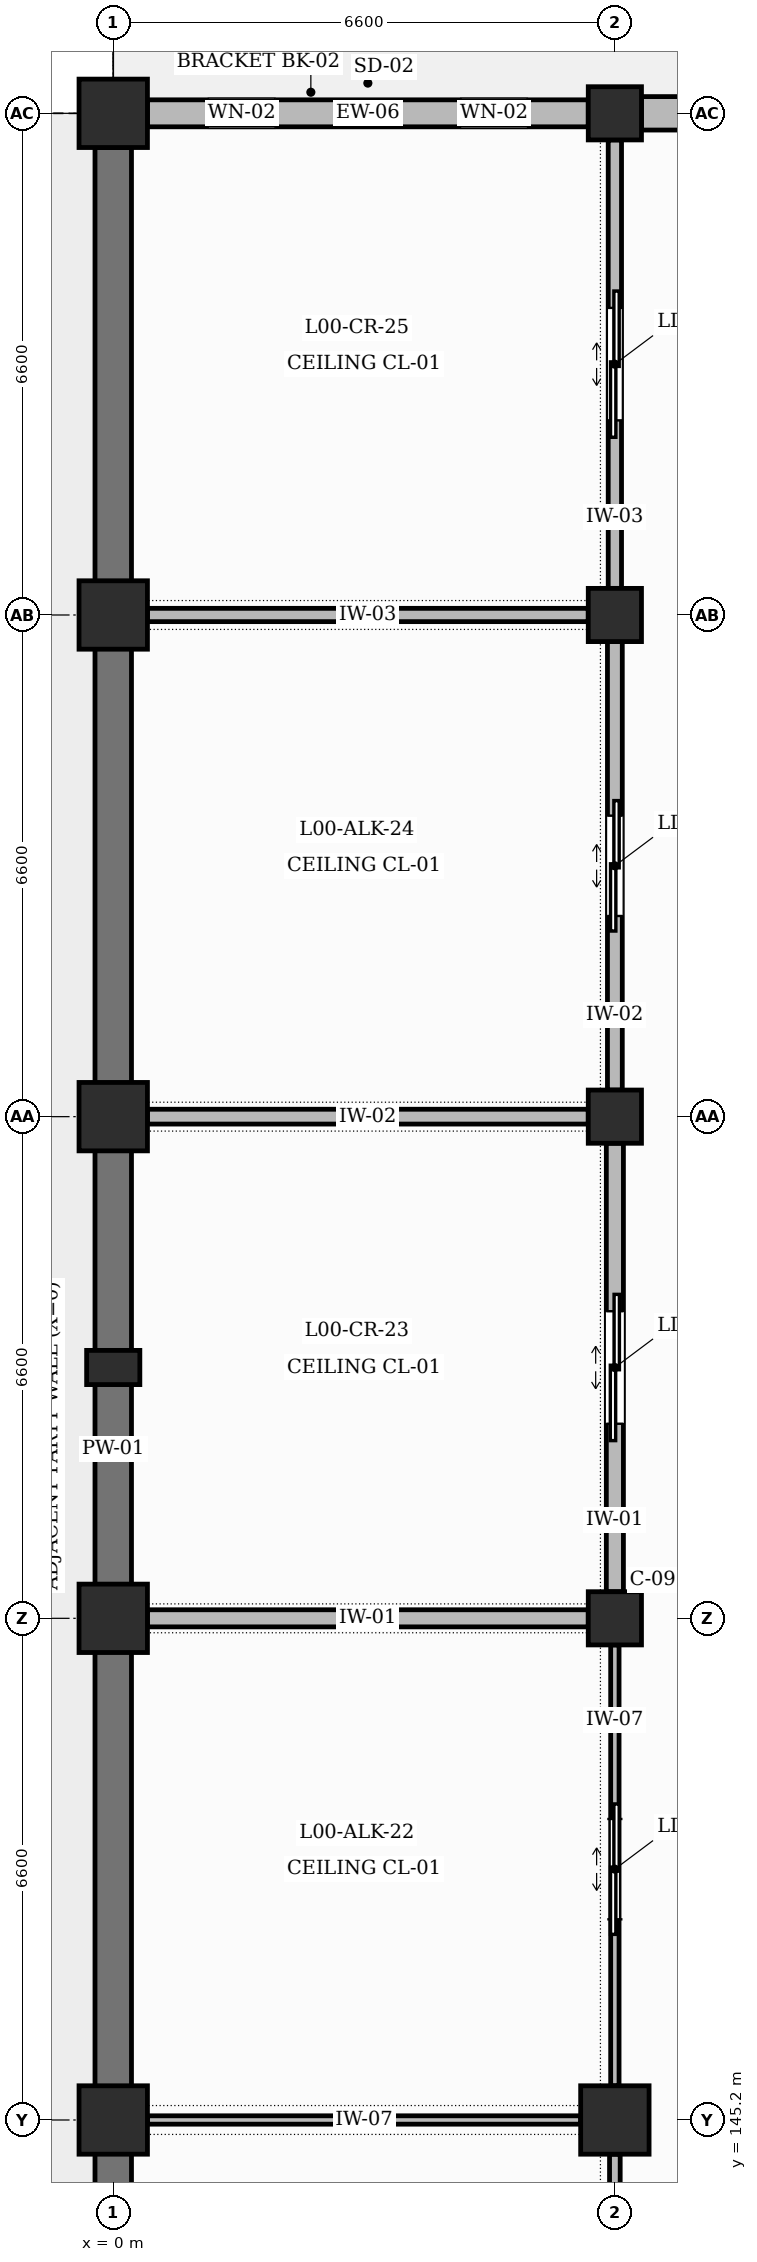
"""IFC4 building model, lengths in metres.
Left out: names, types, materials, properties, quantities, classifications, styles, units other than length and angle.
Written with IfcOpenShell. Run it as: python <this file> out.ifc"""

import sys

from ifc_helpers import new_model, si_unit, direction, frame, frame_2d, origin, origin_2d, place, context, subcontext, project, spatial, rectangle, circle, extrude, element, fill, save


model = new_model("IFC4")
c1 = context("Model", 3, precision=1e-05, world=origin(), true_north=direction((0.0, 1.0)))
c2 = subcontext(c1, "Body", "Model", "MODEL_VIEW")
j1 = project(units=[si_unit("LENGTHUNIT", "METRE"), si_unit("PLANEANGLEUNIT", "RADIAN")], contexts=[c1])
p1 = place(None, origin())
s1 = spatial("IfcSite", under=j1, at=p1, CompositionType="ELEMENT")
p2 = place(p1, origin())
s2 = spatial("IfcBuilding", under=s1, at=p2, CompositionType="ELEMENT")
p3 = place(p2, origin())
s3 = spatial("IfcBuildingStorey", under=s2, at=p3, CompositionType="ELEMENT", Elevation=0.0)
p4 = place(p3, frame((0.0, 155.1, 0.0), z_axis=(0.0, 0.0, 1.0), x_axis=(0.0, 1.0, 0.0)))
e1 = element("IfcColumn", 1, at=p4, inside=s3, PredefinedType="PILASTER", context=c2, shape_type="SweptSolid", body=[
    extrude(rectangle(XDim=0.45, YDim=0.7, at=origin_2d()), origin(), (0.0, 0.0, 1.0), 5.4),
])
for number, where, z_axis, x_axis in (
    (2, (0.0, 145.2, 0.0), (0.0, 0.0, 1.0), (1.0, 0.0, 0.0)),
    (3, (0.0, 151.8, 0.0), (0.0, 0.0, 1.0), (1.0, 0.0, 0.0)),
    (4, (0.0, 158.4, 0.0), (0.0, 0.0, 1.0), (1.0, 0.0, 0.0)),
    (5, (0.0, 165.0, 0.0), (0.0, 0.0, 1.0), (1.0, 0.0, 0.0)),
    (6, (0.0, 171.6, 0.0), (0.0, 0.0, 1.0), (1.0, 0.0, 0.0)),
    (7, (6.6, 145.2, 0.0), (0.0, 0.0, 1.0), (1.0, 0.0, 0.0)),
):
    element("IfcColumn", number, at=place(p3, frame(where, z_axis=z_axis, x_axis=x_axis)), inside=s3, PredefinedType="COLUMN", context=c2, shape_type="SweptSolid", body=[
        extrude(rectangle(XDim=0.9, YDim=0.9, at=origin_2d()), origin(), (0.0, 0.0, 1.0), 5.4),
    ])
for number, where, z_axis, x_axis in (
    (8, (6.6, 151.8, 0.0), (0.0, 0.0, 1.0), (1.0, 0.0, 0.0)),
    (9, (6.6, 158.4, 0.0), (0.0, 0.0, 1.0), (1.0, 0.0, 0.0)),
    (10, (6.6, 165.0, 0.0), (0.0, 0.0, 1.0), (1.0, 0.0, 0.0)),
    (11, (6.6, 171.6, 0.0), (0.0, 0.0, 1.0), (1.0, 0.0, 0.0)),
):
    element("IfcColumn", number, at=place(p3, frame(where, z_axis=z_axis, x_axis=x_axis)), inside=s3, PredefinedType="COLUMN", context=c2, shape_type="SweptSolid", body=[
        extrude(circle(Radius=0.35, at=origin_2d()), origin(), (0.0, 0.0, 1.0), 5.4),
    ])
p5 = place(p3, frame((0.0, 139.05, 0.0), z_axis=(0.0, 0.0, 1.0), x_axis=(0.0, 1.0, 0.0)))
e12 = element("IfcWall", 12, at=p5, inside=s3, PredefinedType="SOLIDWALL", context=c2, shape_type="SweptSolid", body=[
    extrude(rectangle(XDim=5.7, YDim=0.48, at=frame_2d((2.85, 0.0))), origin(), (0.0, 0.0, 1.0), 4.45),
])
p6 = place(p3, frame((0.0, 145.65, 0.0), z_axis=(0.0, 0.0, 1.0), x_axis=(0.0, 1.0, 0.0)))
e13 = element("IfcWall", 13, at=p6, inside=s3, PredefinedType="SOLIDWALL", context=c2, shape_type="SweptSolid", body=[
    extrude(rectangle(XDim=5.7, YDim=0.48, at=frame_2d((2.85, 0.0))), origin(), (0.0, 0.0, 1.0), 4.45),
])
for number, where, z_axis, x_axis in (
    (14, (0.0, 152.25, 0.0), (0.0, 0.0, 1.0), (0.0, 1.0, 0.0)),
    (15, (0.0, 158.85, 0.0), (0.0, 0.0, 1.0), (0.0, 1.0, 0.0)),
):
    element("IfcWall", number, at=place(p3, frame(where, z_axis=z_axis, x_axis=x_axis)), inside=s3, PredefinedType="SOLIDWALL", context=c2, shape_type="SweptSolid", body=[
        extrude(rectangle(XDim=5.7, YDim=0.48, at=frame_2d((2.85, 0.0))), origin(), (0.0, 0.0, 1.0), 4.45),
    ])
p7 = place(p3, frame((0.45, 171.6, 0.0), z_axis=(0.0, 0.0, 1.0), x_axis=(1.0, 0.0, 0.0)))
e16 = element("IfcWall", 16, at=p7, inside=s3, PredefinedType="SOLIDWALL", context=c2, shape_type="SweptSolid", body=[
    extrude(rectangle(XDim=5.8, YDim=0.355, at=frame_2d((2.9, 0.0))), origin(), (0.0, 0.0, 1.0), 4.45),
])
p8 = place(p7, frame((0.8, 0.0, 0.95)))
e17 = element("IfcOpeningElement", 17, at=p8, cuts=e16, PredefinedType="OPENING", context=c2, shape_type="SweptSolid", body=[
    extrude(rectangle(XDim=0.88, YDim=1.52, at=frame_2d((0.44, 0.76))), frame((0.0, 0.188, 0.0), z_axis=(0.0, -1.0, 0.0), x_axis=(1.0, 0.0, 0.0)), (0.0, 0.0, 1.0), 0.375),
])
p9 = place(p7, frame((4.12, 0.0, 0.95)))
e18 = element("IfcOpeningElement", 18, at=p9, cuts=e16, PredefinedType="OPENING", context=c2, shape_type="SweptSolid", body=[
    extrude(rectangle(XDim=0.88, YDim=1.52, at=frame_2d((0.44, 0.76))), frame((0.0, 0.188, 0.0), z_axis=(0.0, -1.0, 0.0), x_axis=(1.0, 0.0, 0.0)), (0.0, 0.0, 1.0), 0.375),
])
p10 = place(p3, frame((0.0, 165.45, 0.0), z_axis=(0.0, 0.0, 1.0), x_axis=(0.0, 1.0, 0.0)))
e19 = element("IfcWall", 19, at=p10, inside=s3, PredefinedType="SOLIDWALL", context=c2, shape_type="SweptSolid", body=[
    extrude(rectangle(XDim=5.7, YDim=0.48, at=frame_2d((2.85, 0.0))), origin(), (0.0, 0.0, 1.0), 4.45),
])
p11 = place(p3, frame((6.95, 171.6, 0.0), z_axis=(0.0, 0.0, 1.0), x_axis=(1.0, 0.0, 0.0)))
e20 = element("IfcWall", 20, at=p11, inside=s3, PredefinedType="SOLIDWALL", context=c2, shape_type="SweptSolid", body=[
    extrude(rectangle(XDim=5.9, YDim=0.44, at=frame_2d((2.95, 0.0))), origin(), (0.0, 0.0, 1.0), 4.45),
])
p12 = place(p11, frame((1.95, 0.0, 0.0)))
e21 = element("IfcOpeningElement", 21, at=p12, cuts=e20, PredefinedType="OPENING", context=c2, shape_type="SweptSolid", body=[
    extrude(rectangle(XDim=2.0, YDim=2.5, at=frame_2d((1.0, 1.25))), frame((0.0, 0.23, 0.0), z_axis=(0.0, -1.0, 0.0), x_axis=(1.0, 0.0, 0.0)), (0.0, 0.0, 1.0), 0.46),
])
p13 = place(p3, frame((6.6, 139.05, 0.0), z_axis=(0.0, 0.0, 1.0), x_axis=(0.0, 1.0, 0.0)))
e22 = element("IfcWall", 22, at=p13, inside=s3, PredefinedType="PARTITIONING", context=c2, shape_type="SweptSolid", body=[
    extrude(rectangle(XDim=5.7, YDim=0.14, at=frame_2d((2.85, 0.0))), origin(), (0.0, 0.0, 1.0), 4.3),
])
p14 = place(p13, frame((2.11, 0.0, 0.0)))
e23 = element("IfcOpeningElement", 23, at=p14, cuts=e22, PredefinedType="OPENING", context=c2, shape_type="SweptSolid", body=[
    extrude(rectangle(XDim=1.48, YDim=2.25, at=frame_2d((0.74, 1.125))), frame((0.0, 0.08, 0.0), z_axis=(0.0, -1.0, 0.0), x_axis=(1.0, 0.0, 0.0)), (0.0, 0.0, 1.0), 0.16),
])
p15 = place(p3, frame((0.45, 145.2, 0.0), z_axis=(0.0, 0.0, 1.0), x_axis=(1.0, 0.0, 0.0)))
e24 = element("IfcWall", 24, at=p15, inside=s3, PredefinedType="PARTITIONING", context=c2, shape_type="SweptSolid", body=[
    extrude(rectangle(XDim=5.7, YDim=0.11, at=frame_2d((2.85, 0.0))), origin(), (0.0, 0.0, 1.0), 4.2),
])
p16 = place(p3, frame((6.6, 145.65, 0.0), z_axis=(0.0, 0.0, 1.0), x_axis=(0.0, 1.0, 0.0)))
e25 = element("IfcWall", 25, at=p16, inside=s3, PredefinedType="PARTITIONING", context=c2, shape_type="SweptSolid", body=[
    extrude(rectangle(XDim=5.8, YDim=0.11, at=frame_2d((2.9, 0.0))), origin(), (0.0, 0.0, 1.0), 4.3),
])
p17 = place(p16, frame((2.19, 0.0, 0.0)))
e26 = element("IfcOpeningElement", 26, at=p17, cuts=e25, PredefinedType="OPENING", context=c2, shape_type="SweptSolid", body=[
    extrude(rectangle(XDim=1.32, YDim=2.2, at=frame_2d((0.66, 1.1))), frame((0.0, 0.065, 0.0), z_axis=(0.0, -1.0, 0.0), x_axis=(1.0, 0.0, 0.0)), (0.0, 0.0, 1.0), 0.13),
])
p18 = place(p3, frame((0.45, 151.8, 0.0), z_axis=(0.0, 0.0, 1.0), x_axis=(1.0, 0.0, 0.0)))
e27 = element("IfcWall", 27, at=p18, inside=s3, PredefinedType="PARTITIONING", context=c2, shape_type="SweptSolid", body=[
    extrude(rectangle(XDim=5.8, YDim=0.225, at=frame_2d((2.9, 0.0))), origin(), (0.0, 0.0, 1.0), 4.3),
])
p19 = place(p3, frame((6.6, 152.15, 0.0), z_axis=(0.0, 0.0, 1.0), x_axis=(0.0, 1.0, 0.0)))
e28 = element("IfcWall", 28, at=p19, inside=s3, PredefinedType="PARTITIONING", context=c2, shape_type="SweptSolid", body=[
    extrude(rectangle(XDim=5.9, YDim=0.225, at=frame_2d((2.95, 0.0))), origin(), (0.0, 0.0, 1.0), 4.3),
])
p20 = place(p19, frame((2.21, 0.0, 0.0)))
e29 = element("IfcOpeningElement", 29, at=p20, cuts=e28, PredefinedType="OPENING", context=c2, shape_type="SweptSolid", body=[
    extrude(rectangle(XDim=1.48, YDim=2.25, at=frame_2d((0.74, 1.125))), frame((0.0, 0.123, 0.0), z_axis=(0.0, -1.0, 0.0), x_axis=(1.0, 0.0, 0.0)), (0.0, 0.0, 1.0), 0.245),
])
p21 = place(p3, frame((0.45, 158.4, 0.0), z_axis=(0.0, 0.0, 1.0), x_axis=(1.0, 0.0, 0.0)))
e30 = element("IfcWall", 30, at=p21, inside=s3, PredefinedType="PARTITIONING", context=c2, shape_type="SweptSolid", body=[
    extrude(rectangle(XDim=5.8, YDim=0.195, at=frame_2d((2.9, 0.0))), origin(), (0.0, 0.0, 1.0), 4.2),
])
p22 = place(p3, frame((6.6, 158.75, 0.0), z_axis=(0.0, 0.0, 1.0), x_axis=(0.0, 1.0, 0.0)))
e31 = element("IfcWall", 31, at=p22, inside=s3, PredefinedType="PARTITIONING", context=c2, shape_type="SweptSolid", body=[
    extrude(rectangle(XDim=5.9, YDim=0.195, at=frame_2d((2.95, 0.0))), origin(), (0.0, 0.0, 1.0), 4.3),
])
p23 = place(p22, frame((2.29, 0.0, 0.0)))
e32 = element("IfcOpeningElement", 32, at=p23, cuts=e31, PredefinedType="OPENING", context=c2, shape_type="SweptSolid", body=[
    extrude(rectangle(XDim=1.32, YDim=2.2, at=frame_2d((0.66, 1.1))), frame((0.0, 0.107, 0.0), z_axis=(0.0, -1.0, 0.0), x_axis=(1.0, 0.0, 0.0)), (0.0, 0.0, 1.0), 0.215),
])
p24 = place(p3, frame((0.45, 165.0, 0.0), z_axis=(0.0, 0.0, 1.0), x_axis=(1.0, 0.0, 0.0)))
e33 = element("IfcWall", 33, at=p24, inside=s3, PredefinedType="PARTITIONING", context=c2, shape_type="SweptSolid", body=[
    extrude(rectangle(XDim=5.8, YDim=0.175, at=frame_2d((2.9, 0.0))), origin(), (0.0, 0.0, 1.0), 4.3),
])
p25 = place(p3, frame((6.6, 165.35, 0.0), z_axis=(0.0, 0.0, 1.0), x_axis=(0.0, 1.0, 0.0)))
e34 = element("IfcWall", 34, at=p25, inside=s3, PredefinedType="PARTITIONING", context=c2, shape_type="SweptSolid", body=[
    extrude(rectangle(XDim=5.9, YDim=0.175, at=frame_2d((2.95, 0.0))), origin(), (0.0, 0.0, 1.0), 4.3),
])
p26 = place(p25, frame((2.21, 0.0, 0.0)))
e35 = element("IfcOpeningElement", 35, at=p26, cuts=e34, PredefinedType="OPENING", context=c2, shape_type="SweptSolid", body=[
    extrude(rectangle(XDim=1.48, YDim=2.25, at=frame_2d((0.74, 1.125))), frame((0.0, 0.097, 0.0), z_axis=(0.0, -1.0, 0.0), x_axis=(1.0, 0.0, 0.0)), (0.0, 0.0, 1.0), 0.195),
])
p27 = place(p8, origin())
e36 = element("IfcWindow", 36, at=p27, inside=s3, PartitioningType="SINGLE_PANEL", PredefinedType="WINDOW", context=c2, shape_type="SweptSolid", body=[
    extrude(rectangle(XDim=0.88, YDim=1.52, at=frame_2d((0.44, 0.76))), frame((0.0, 0.03, 0.0), z_axis=(0.0, -1.0, 0.0), x_axis=(1.0, 0.0, 0.0)), (0.0, 0.0, 1.0), 0.06),
])
fill(e17, e36)
p28 = place(p9, origin())
e37 = element("IfcWindow", 37, at=p28, inside=s3, PartitioningType="SINGLE_PANEL", PredefinedType="WINDOW", context=c2, shape_type="SweptSolid", body=[
    extrude(rectangle(XDim=0.88, YDim=1.52, at=frame_2d((0.44, 0.76))), frame((0.0, 0.03, 0.0), z_axis=(0.0, -1.0, 0.0), x_axis=(1.0, 0.0, 0.0)), (0.0, 0.0, 1.0), 0.06),
])
fill(e18, e37)
p29 = place(p17, origin())
e38 = element("IfcDoor", 38, at=p29, inside=s3, OperationType="DOUBLE_DOOR_SLIDING", PredefinedType="USERDEFINED", context=c2, shape_type="SweptSolid", body=[
    extrude(rectangle(XDim=1.32, YDim=2.2, at=frame_2d((0.66, 1.1))), frame((0.0, 0.025, 0.0), z_axis=(0.0, -1.0, 0.0), x_axis=(1.0, 0.0, 0.0)), (0.0, 0.0, 1.0), 0.05),
])
fill(e26, e38)
p30 = place(p20, origin())
e39 = element("IfcDoor", 39, at=p30, inside=s3, OperationType="DOUBLE_DOOR_SLIDING", PredefinedType="USERDEFINED", context=c2, shape_type="SweptSolid", body=[
    extrude(rectangle(XDim=1.48, YDim=2.25, at=frame_2d((0.74, 1.125))), frame((0.0, 0.025, 0.0), z_axis=(0.0, -1.0, 0.0), x_axis=(1.0, 0.0, 0.0)), (0.0, 0.0, 1.0), 0.05),
])
fill(e29, e39)
p31 = place(p23, origin())
e40 = element("IfcDoor", 40, at=p31, inside=s3, OperationType="DOUBLE_DOOR_SLIDING", PredefinedType="USERDEFINED", context=c2, shape_type="SweptSolid", body=[
    extrude(rectangle(XDim=1.32, YDim=2.2, at=frame_2d((0.66, 1.1))), frame((0.0, 0.025, 0.0), z_axis=(0.0, -1.0, 0.0), x_axis=(1.0, 0.0, 0.0)), (0.0, 0.0, 1.0), 0.05),
])
fill(e32, e40)
p32 = place(p26, origin())
e41 = element("IfcDoor", 41, at=p32, inside=s3, OperationType="DOUBLE_DOOR_SLIDING", PredefinedType="USERDEFINED", context=c2, shape_type="SweptSolid", body=[
    extrude(rectangle(XDim=1.48, YDim=2.25, at=frame_2d((0.74, 1.125))), frame((0.0, 0.025, 0.0), z_axis=(0.0, -1.0, 0.0), x_axis=(1.0, 0.0, 0.0)), (0.0, 0.0, 1.0), 0.05),
])
fill(e35, e41)
save(model, sys.argv[1])
